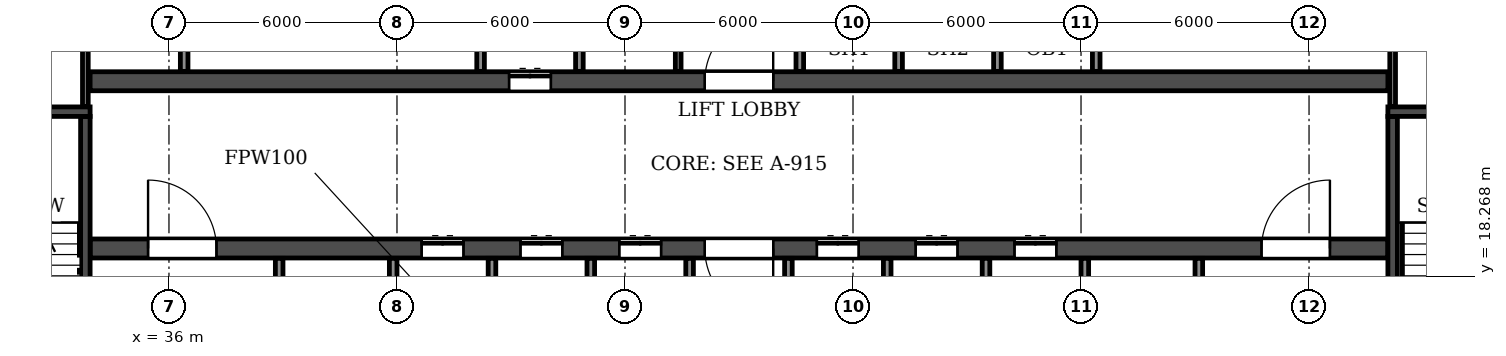
"""IFC4 building model, lengths in metres.
Left out: names, types, materials, properties, quantities, classifications, styles, units other than length and angle.
Written with IfcOpenShell. Run it as: python <this file> out.ifc"""

import sys

from ifc_helpers import new_model, si_unit, direction, frame, frame_2d, origin, place, context, subcontext, project, spatial, rectangle, extrude, element, fill, save


model = new_model("IFC4")
c1 = context("Model", 3, precision=1e-05, world=origin(), true_north=direction((0.0, 1.0)))
c2 = subcontext(c1, "Body", "Model", "MODEL_VIEW")
j1 = project(units=[si_unit("LENGTHUNIT", "METRE"), si_unit("PLANEANGLEUNIT", "RADIAN")], contexts=[c1])
p1 = place(None, origin())
s1 = spatial("IfcSite", under=j1, at=p1, CompositionType="ELEMENT")
p2 = place(p1, origin())
s2 = spatial("IfcBuilding", under=s1, at=p2, CompositionType="ELEMENT")
p3 = place(p2, frame((0.0, 0.0, 76.2)))
s3 = spatial("IfcBuildingStorey", under=s2, at=p3, CompositionType="ELEMENT", Elevation=76.2)
p4 = place(p3, frame((33.925, 19.0, 0.0), z_axis=(0.0, 0.0, 1.0), x_axis=(1.0, 0.0, 0.0)))
e1 = element("IfcWall", 1, at=p4, inside=s3, PredefinedType="SOLIDWALL", context=c2, shape_type="SweptSolid", body=[
    extrude(rectangle(XDim=34.15, YDim=0.5, at=frame_2d((17.075, 0.0))), origin(), (0.0, 0.0, 1.0), 3.06),
])
p5 = place(p4, frame((16.175, 0.0, 0.0)))
e2 = element("IfcOpeningElement", 2, at=p5, cuts=e1, PredefinedType="OPENING", context=c2, shape_type="SweptSolid", body=[
    extrude(rectangle(XDim=1.8, YDim=2.1, at=frame_2d((0.9, 1.05))), frame((0.0, 0.26, 0.0), z_axis=(0.0, -1.0, 0.0), x_axis=(1.0, 0.0, 0.0)), (0.0, 0.0, 1.0), 0.52),
])
p6 = place(p4, frame((1.525, 0.0, 0.0)))
e3 = element("IfcOpeningElement", 3, at=p6, cuts=e1, PredefinedType="OPENING", context=c2, shape_type="SweptSolid", body=[
    extrude(rectangle(XDim=1.8, YDim=2.1, at=frame_2d((0.9, 1.05))), frame((0.0, 0.26, 0.0), z_axis=(0.0, -1.0, 0.0), x_axis=(1.0, 0.0, 0.0)), (0.0, 0.0, 1.0), 0.52),
])
p7 = place(p4, frame((8.725, 0.0, 0.0)))
e4 = element("IfcOpeningElement", 4, at=p7, cuts=e1, PredefinedType="OPENING", context=c2, shape_type="SweptSolid", body=[
    extrude(rectangle(XDim=1.1, YDim=2.1, at=frame_2d((0.55, 1.05))), frame((0.0, 0.26, 0.0), z_axis=(0.0, -1.0, 0.0), x_axis=(1.0, 0.0, 0.0)), (0.0, 0.0, 1.0), 0.52),
])
p8 = place(p4, frame((11.325, 0.0, 0.0)))
e5 = element("IfcOpeningElement", 5, at=p8, cuts=e1, PredefinedType="OPENING", context=c2, shape_type="SweptSolid", body=[
    extrude(rectangle(XDim=1.1, YDim=2.1, at=frame_2d((0.55, 1.05))), frame((0.0, 0.26, 0.0), z_axis=(0.0, -1.0, 0.0), x_axis=(1.0, 0.0, 0.0)), (0.0, 0.0, 1.0), 0.52),
])
p9 = place(p4, frame((13.925, 0.0, 0.0)))
e6 = element("IfcOpeningElement", 6, at=p9, cuts=e1, PredefinedType="OPENING", context=c2, shape_type="SweptSolid", body=[
    extrude(rectangle(XDim=1.1, YDim=2.1, at=frame_2d((0.55, 1.05))), frame((0.0, 0.26, 0.0), z_axis=(0.0, -1.0, 0.0), x_axis=(1.0, 0.0, 0.0)), (0.0, 0.0, 1.0), 0.52),
])
p10 = place(p4, frame((19.125, 0.0, 0.0)))
e7 = element("IfcOpeningElement", 7, at=p10, cuts=e1, PredefinedType="OPENING", context=c2, shape_type="SweptSolid", body=[
    extrude(rectangle(XDim=1.1, YDim=2.1, at=frame_2d((0.55, 1.05))), frame((0.0, 0.26, 0.0), z_axis=(0.0, -1.0, 0.0), x_axis=(1.0, 0.0, 0.0)), (0.0, 0.0, 1.0), 0.52),
])
p11 = place(p4, frame((21.725, 0.0, 0.0)))
e8 = element("IfcOpeningElement", 8, at=p11, cuts=e1, PredefinedType="OPENING", context=c2, shape_type="SweptSolid", body=[
    extrude(rectangle(XDim=1.1, YDim=2.1, at=frame_2d((0.55, 1.05))), frame((0.0, 0.26, 0.0), z_axis=(0.0, -1.0, 0.0), x_axis=(1.0, 0.0, 0.0)), (0.0, 0.0, 1.0), 0.52),
])
p12 = place(p4, frame((24.325, 0.0, 0.0)))
e9 = element("IfcOpeningElement", 9, at=p12, cuts=e1, PredefinedType="OPENING", context=c2, shape_type="SweptSolid", body=[
    extrude(rectangle(XDim=1.1, YDim=2.1, at=frame_2d((0.55, 1.05))), frame((0.0, 0.26, 0.0), z_axis=(0.0, -1.0, 0.0), x_axis=(1.0, 0.0, 0.0)), (0.0, 0.0, 1.0), 0.52),
])
p13 = place(p4, frame((30.825, 0.0, 0.0)))
e10 = element("IfcOpeningElement", 10, at=p13, cuts=e1, PredefinedType="OPENING", context=c2, shape_type="SweptSolid", body=[
    extrude(rectangle(XDim=1.8, YDim=2.1, at=frame_2d((0.9, 1.05))), frame((0.0, 0.26, 0.0), z_axis=(0.0, -1.0, 0.0), x_axis=(1.0, 0.0, 0.0)), (0.0, 0.0, 1.0), 0.52),
])
p14 = place(p3, frame((33.925, 23.4, 0.0), z_axis=(0.0, 0.0, 1.0), x_axis=(1.0, 0.0, 0.0)))
e11 = element("IfcWall", 11, at=p14, inside=s3, PredefinedType="SOLIDWALL", context=c2, shape_type="SweptSolid", body=[
    extrude(rectangle(XDim=34.15, YDim=0.5, at=frame_2d((17.075, 0.0))), origin(), (0.0, 0.0, 1.0), 3.06),
])
p15 = place(p14, frame((16.175, 0.0, 0.0)))
e12 = element("IfcOpeningElement", 12, at=p15, cuts=e11, PredefinedType="OPENING", context=c2, shape_type="SweptSolid", body=[
    extrude(rectangle(XDim=1.8, YDim=2.1, at=frame_2d((0.9, 1.05))), frame((0.0, 0.26, 0.0), z_axis=(0.0, -1.0, 0.0), x_axis=(1.0, 0.0, 0.0)), (0.0, 0.0, 1.0), 0.52),
])
p16 = place(p14, frame((11.025, 0.0, 0.0)))
e13 = element("IfcOpeningElement", 13, at=p16, cuts=e11, PredefinedType="OPENING", context=c2, shape_type="SweptSolid", body=[
    extrude(rectangle(XDim=1.1, YDim=2.1, at=frame_2d((0.55, 1.05))), frame((0.0, 0.26, 0.0), z_axis=(0.0, -1.0, 0.0), x_axis=(1.0, 0.0, 0.0)), (0.0, 0.0, 1.0), 0.52),
])
p17 = place(p3, frame((33.8, 14.85, 0.0), z_axis=(0.0, 0.0, 1.0), x_axis=(0.0, 1.0, 0.0)))
e14 = element("IfcWall", 14, at=p17, inside=s3, PredefinedType="SOLIDWALL", context=c2, shape_type="SweptSolid", body=[
    extrude(rectangle(XDim=7.625, YDim=0.25, at=frame_2d((3.812, 0.0))), origin(), (0.0, 0.0, 1.0), 3.06),
])
p18 = place(p17, frame((0.45, 0.0, 0.0)))
e15 = element("IfcOpeningElement", 15, at=p18, cuts=e14, PredefinedType="OPENING", context=c2, shape_type="SweptSolid", body=[
    extrude(rectangle(XDim=1.0, YDim=2.1, at=frame_2d((0.5, 1.05))), frame((0.0, 0.135, 0.0), z_axis=(0.0, -1.0, 0.0), x_axis=(1.0, 0.0, 0.0)), (0.0, 0.0, 1.0), 0.27),
])
p19 = place(p3, frame((29.875, 22.6, 0.0), z_axis=(0.0, 0.0, 1.0), x_axis=(1.0, 0.0, 0.0)))
e16 = element("IfcWall", 16, at=p19, inside=s3, PredefinedType="SOLIDWALL", context=c2, shape_type="SweptSolid", body=[
    extrude(rectangle(XDim=4.05, YDim=0.25, at=frame_2d((2.025, 0.0))), origin(), (0.0, 0.0, 1.0), 3.06),
])
p20 = place(p3, frame((68.2, 14.85, 0.0), z_axis=(0.0, 0.0, 1.0), x_axis=(0.0, 1.0, 0.0)))
e17 = element("IfcWall", 17, at=p20, inside=s3, PredefinedType="SOLIDWALL", context=c2, shape_type="SweptSolid", body=[
    extrude(rectangle(XDim=7.625, YDim=0.25, at=frame_2d((3.812, 0.0))), origin(), (0.0, 0.0, 1.0), 3.06),
])
p21 = place(p20, frame((0.45, 0.0, 0.0)))
e18 = element("IfcOpeningElement", 18, at=p21, cuts=e17, PredefinedType="OPENING", context=c2, shape_type="SweptSolid", body=[
    extrude(rectangle(XDim=1.0, YDim=2.1, at=frame_2d((0.5, 1.05))), frame((0.0, 0.135, 0.0), z_axis=(0.0, -1.0, 0.0), x_axis=(1.0, 0.0, 0.0)), (0.0, 0.0, 1.0), 0.27),
])
p22 = place(p3, frame((68.075, 22.6, 0.0), z_axis=(0.0, 0.0, 1.0), x_axis=(1.0, 0.0, 0.0)))
e19 = element("IfcWall", 19, at=p22, inside=s3, PredefinedType="SOLIDWALL", context=c2, shape_type="SweptSolid", body=[
    extrude(rectangle(XDim=4.05, YDim=0.25, at=frame_2d((2.025, 0.0))), origin(), (0.0, 0.0, 1.0), 3.06),
])
p23 = place(p3, frame((49.4, 23.66, 0.0), z_axis=(0.0, 0.0, 1.0), x_axis=(0.0, 1.0, 0.0)))
e20 = element("IfcWall", 20, at=p23, inside=s3, PredefinedType="PARTITIONING", context=c2, shape_type="SweptSolid", body=[
    extrude(rectangle(XDim=3.88, YDim=0.15, at=frame_2d((1.94, 0.0))), origin(), (0.0, 0.0, 1.0), 3.06),
])
p24 = place(p3, frame((36.4, 23.66, 0.0), z_axis=(0.0, 0.0, 1.0), x_axis=(0.0, 1.0, 0.0)))
e21 = element("IfcWall", 21, at=p24, inside=s3, PredefinedType="PARTITIONING", context=c2, shape_type="SweptSolid", body=[
    extrude(rectangle(XDim=3.88, YDim=0.2, at=frame_2d((1.94, 0.0))), origin(), (0.0, 0.0, 1.0), 3.06),
])
for number, where, z_axis, x_axis in (
    (22, (33.8, 22.735, 0.0), (0.0, 0.0, 1.0), (0.0, 1.0, 0.0)),
    (23, (68.2, 22.735, 0.0), (0.0, 0.0, 1.0), (0.0, 1.0, 0.0)),
):
    element("IfcWall", number, at=place(p3, frame(where, z_axis=z_axis, x_axis=x_axis)), inside=s3, PredefinedType="PARTITIONING", context=c2, shape_type="SweptSolid", body=[
        extrude(rectangle(XDim=4.805, YDim=0.15, at=frame_2d((2.402, 0.0))), origin(), (0.0, 0.0, 1.0), 3.06),
    ])
p25 = place(p3, frame((38.9, 14.86, 0.0), z_axis=(0.0, 0.0, 1.0), x_axis=(0.0, 1.0, 0.0)))
e24 = element("IfcWall", 24, at=p25, inside=s3, PredefinedType="PARTITIONING", context=c2, shape_type="SweptSolid", body=[
    extrude(rectangle(XDim=3.88, YDim=0.2, at=frame_2d((1.94, 0.0))), origin(), (0.0, 0.0, 1.0), 3.06),
])
p26 = place(p25, frame((1.39, 0.0, 0.0)))
e25 = element("IfcOpeningElement", 25, at=p26, cuts=e24, PredefinedType="OPENING", context=c2, shape_type="SweptSolid", body=[
    extrude(rectangle(XDim=1.1, YDim=2.1, at=frame_2d((0.55, 1.05))), frame((0.0, 0.11, 0.0), z_axis=(0.0, -1.0, 0.0), x_axis=(1.0, 0.0, 0.0)), (0.0, 0.0, 1.0), 0.22),
])
p27 = place(p3, frame((41.9, 14.86, 0.0), z_axis=(0.0, 0.0, 1.0), x_axis=(0.0, 1.0, 0.0)))
e26 = element("IfcWall", 26, at=p27, inside=s3, PredefinedType="PARTITIONING", context=c2, shape_type="SweptSolid", body=[
    extrude(rectangle(XDim=3.88, YDim=0.2, at=frame_2d((1.94, 0.0))), origin(), (0.0, 0.0, 1.0), 3.06),
])
p28 = place(p3, frame((44.2, 23.66, 0.0), z_axis=(0.0, 0.0, 1.0), x_axis=(0.0, 1.0, 0.0)))
e27 = element("IfcWall", 27, at=p28, inside=s3, PredefinedType="PARTITIONING", context=c2, shape_type="SweptSolid", body=[
    extrude(rectangle(XDim=3.88, YDim=0.2, at=frame_2d((1.94, 0.0))), origin(), (0.0, 0.0, 1.0), 3.06),
])
p29 = place(p3, frame((44.5, 16.3, 0.0), z_axis=(0.0, 0.0, 1.0), x_axis=(0.0, 1.0, 0.0)))
e28 = element("IfcWall", 28, at=p29, inside=s3, PredefinedType="PARTITIONING", context=c2, shape_type="SweptSolid", body=[
    extrude(rectangle(XDim=2.44, YDim=0.2, at=frame_2d((1.22, 0.0))), origin(), (0.0, 0.0, 1.0), 3.06),
])
p30 = place(p3, frame((46.8, 23.66, 0.0), z_axis=(0.0, 0.0, 1.0), x_axis=(0.0, 1.0, 0.0)))
e29 = element("IfcWall", 29, at=p30, inside=s3, PredefinedType="PARTITIONING", context=c2, shape_type="SweptSolid", body=[
    extrude(rectangle(XDim=3.88, YDim=0.2, at=frame_2d((1.94, 0.0))), origin(), (0.0, 0.0, 1.0), 3.06),
])
for number, where, z_axis, x_axis in (
    (30, (47.1, 16.3, 0.0), (0.0, 0.0, 1.0), (0.0, 1.0, 0.0)),
    (31, (49.7, 16.3, 0.0), (0.0, 0.0, 1.0), (0.0, 1.0, 0.0)),
    (32, (52.3, 16.3, 0.0), (0.0, 0.0, 1.0), (0.0, 1.0, 0.0)),
):
    element("IfcWall", number, at=place(p3, frame(where, z_axis=z_axis, x_axis=x_axis)), inside=s3, PredefinedType="PARTITIONING", context=c2, shape_type="SweptSolid", body=[
        extrude(rectangle(XDim=2.44, YDim=0.2, at=frame_2d((1.22, 0.0))), origin(), (0.0, 0.0, 1.0), 3.06),
    ])
p31 = place(p3, frame((52.6, 23.66, 0.0), z_axis=(0.0, 0.0, 1.0), x_axis=(0.0, 1.0, 0.0)))
e33 = element("IfcWall", 33, at=p31, inside=s3, PredefinedType="PARTITIONING", context=c2, shape_type="SweptSolid", body=[
    extrude(rectangle(XDim=2.44, YDim=0.2, at=frame_2d((1.22, 0.0))), origin(), (0.0, 0.0, 1.0), 3.06),
])
p32 = place(p3, frame((54.9, 16.3, 0.0), z_axis=(0.0, 0.0, 1.0), x_axis=(0.0, 1.0, 0.0)))
e34 = element("IfcWall", 34, at=p32, inside=s3, PredefinedType="PARTITIONING", context=c2, shape_type="SweptSolid", body=[
    extrude(rectangle(XDim=2.44, YDim=0.2, at=frame_2d((1.22, 0.0))), origin(), (0.0, 0.0, 1.0), 3.06),
])
p33 = place(p3, frame((55.2, 23.66, 0.0), z_axis=(0.0, 0.0, 1.0), x_axis=(0.0, 1.0, 0.0)))
e35 = element("IfcWall", 35, at=p33, inside=s3, PredefinedType="PARTITIONING", context=c2, shape_type="SweptSolid", body=[
    extrude(rectangle(XDim=2.44, YDim=0.2, at=frame_2d((1.22, 0.0))), origin(), (0.0, 0.0, 1.0), 3.06),
])
p34 = place(p3, frame((57.5, 16.3, 0.0), z_axis=(0.0, 0.0, 1.0), x_axis=(0.0, 1.0, 0.0)))
e36 = element("IfcWall", 36, at=p34, inside=s3, PredefinedType="PARTITIONING", context=c2, shape_type="SweptSolid", body=[
    extrude(rectangle(XDim=2.44, YDim=0.2, at=frame_2d((1.22, 0.0))), origin(), (0.0, 0.0, 1.0), 3.06),
])
p35 = place(p3, frame((57.8, 23.66, 0.0), z_axis=(0.0, 0.0, 1.0), x_axis=(0.0, 1.0, 0.0)))
e37 = element("IfcWall", 37, at=p35, inside=s3, PredefinedType="PARTITIONING", context=c2, shape_type="SweptSolid", body=[
    extrude(rectangle(XDim=2.44, YDim=0.2, at=frame_2d((1.22, 0.0))), origin(), (0.0, 0.0, 1.0), 3.06),
])
p36 = place(p3, frame((60.1, 14.86, 0.0), z_axis=(0.0, 0.0, 1.0), x_axis=(0.0, 1.0, 0.0)))
e38 = element("IfcWall", 38, at=p36, inside=s3, PredefinedType="PARTITIONING", context=c2, shape_type="SweptSolid", body=[
    extrude(rectangle(XDim=3.88, YDim=0.2, at=frame_2d((1.94, 0.0))), origin(), (0.0, 0.0, 1.0), 3.06),
])
p37 = place(p3, frame((60.4, 23.66, 0.0), z_axis=(0.0, 0.0, 1.0), x_axis=(0.0, 1.0, 0.0)))
e39 = element("IfcWall", 39, at=p37, inside=s3, PredefinedType="PARTITIONING", context=c2, shape_type="SweptSolid", body=[
    extrude(rectangle(XDim=2.44, YDim=0.2, at=frame_2d((1.22, 0.0))), origin(), (0.0, 0.0, 1.0), 3.06),
])
p38 = place(p3, frame((63.1, 14.86, 0.0), z_axis=(0.0, 0.0, 1.0), x_axis=(0.0, 1.0, 0.0)))
e40 = element("IfcWall", 40, at=p38, inside=s3, PredefinedType="PARTITIONING", context=c2, shape_type="SweptSolid", body=[
    extrude(rectangle(XDim=3.88, YDim=0.2, at=frame_2d((1.94, 0.0))), origin(), (0.0, 0.0, 1.0), 3.06),
])
p39 = place(p38, frame((1.39, 0.0, 0.0)))
e41 = element("IfcOpeningElement", 41, at=p39, cuts=e40, PredefinedType="OPENING", context=c2, shape_type="SweptSolid", body=[
    extrude(rectangle(XDim=1.1, YDim=2.1, at=frame_2d((0.55, 1.05))), frame((0.0, 0.11, 0.0), z_axis=(0.0, -1.0, 0.0), x_axis=(1.0, 0.0, 0.0)), (0.0, 0.0, 1.0), 0.22),
])
p40 = place(p15, origin())
e42 = element("IfcDoor", 42, at=p40, inside=s3, OperationType="DOUBLE_DOOR_SINGLE_SWING", PredefinedType="DOOR", context=c2, shape_type="SweptSolid", body=[
    extrude(rectangle(XDim=1.8, YDim=2.1, at=frame_2d((0.9, 1.05))), frame((0.0, 0.025, 0.0), z_axis=(0.0, -1.0, 0.0), x_axis=(1.0, 0.0, 0.0)), (0.0, 0.0, 1.0), 0.05),
])
fill(e12, e42)
p41 = place(p5, frame((1.8, 0.0, 0.0), z_axis=(0.0, 0.0, 1.0), x_axis=(-1.0, 0.0, 0.0)))
e43 = element("IfcDoor", 43, at=p41, inside=s3, OperationType="DOUBLE_DOOR_SINGLE_SWING", PredefinedType="DOOR", context=c2, shape_type="SweptSolid", body=[
    extrude(rectangle(XDim=1.8, YDim=2.1, at=frame_2d((0.9, 1.05))), frame((0.0, 0.025, 0.0), z_axis=(0.0, -1.0, 0.0), x_axis=(1.0, 0.0, 0.0)), (0.0, 0.0, 1.0), 0.05),
])
fill(e2, e43)
p42 = place(p6, origin())
e44 = element("IfcDoor", 44, at=p42, inside=s3, OperationType="DOUBLE_DOOR_SINGLE_SWING", PredefinedType="DOOR", context=c2, shape_type="SweptSolid", body=[
    extrude(rectangle(XDim=1.8, YDim=2.1, at=frame_2d((0.9, 1.05))), frame((0.0, 0.025, 0.0), z_axis=(0.0, -1.0, 0.0), x_axis=(1.0, 0.0, 0.0)), (0.0, 0.0, 1.0), 0.05),
])
fill(e3, e44)
p43 = place(p7, origin())
e45 = element("IfcDoor", 45, at=p43, inside=s3, OperationType="DOUBLE_DOOR_SLIDING", PredefinedType="DOOR", context=c2, shape_type="SweptSolid", body=[
    extrude(rectangle(XDim=1.1, YDim=2.1, at=frame_2d((0.55, 1.05))), frame((0.0, 0.025, 0.0), z_axis=(0.0, -1.0, 0.0), x_axis=(1.0, 0.0, 0.0)), (0.0, 0.0, 1.0), 0.05),
])
fill(e4, e45)
p44 = place(p16, origin())
e46 = element("IfcDoor", 46, at=p44, inside=s3, OperationType="DOUBLE_DOOR_SLIDING", PredefinedType="DOOR", context=c2, shape_type="SweptSolid", body=[
    extrude(rectangle(XDim=1.1, YDim=2.1, at=frame_2d((0.55, 1.05))), frame((0.0, 0.025, 0.0), z_axis=(0.0, -1.0, 0.0), x_axis=(1.0, 0.0, 0.0)), (0.0, 0.0, 1.0), 0.05),
])
fill(e13, e46)
p45 = place(p8, origin())
e47 = element("IfcDoor", 47, at=p45, inside=s3, OperationType="DOUBLE_DOOR_SLIDING", PredefinedType="DOOR", context=c2, shape_type="SweptSolid", body=[
    extrude(rectangle(XDim=1.1, YDim=2.1, at=frame_2d((0.55, 1.05))), frame((0.0, 0.025, 0.0), z_axis=(0.0, -1.0, 0.0), x_axis=(1.0, 0.0, 0.0)), (0.0, 0.0, 1.0), 0.05),
])
fill(e5, e47)
p46 = place(p9, origin())
e48 = element("IfcDoor", 48, at=p46, inside=s3, OperationType="DOUBLE_DOOR_SLIDING", PredefinedType="DOOR", context=c2, shape_type="SweptSolid", body=[
    extrude(rectangle(XDim=1.1, YDim=2.1, at=frame_2d((0.55, 1.05))), frame((0.0, 0.025, 0.0), z_axis=(0.0, -1.0, 0.0), x_axis=(1.0, 0.0, 0.0)), (0.0, 0.0, 1.0), 0.05),
])
fill(e6, e48)
p47 = place(p10, origin())
e49 = element("IfcDoor", 49, at=p47, inside=s3, OperationType="DOUBLE_DOOR_SLIDING", PredefinedType="DOOR", context=c2, shape_type="SweptSolid", body=[
    extrude(rectangle(XDim=1.1, YDim=2.1, at=frame_2d((0.55, 1.05))), frame((0.0, 0.025, 0.0), z_axis=(0.0, -1.0, 0.0), x_axis=(1.0, 0.0, 0.0)), (0.0, 0.0, 1.0), 0.05),
])
fill(e7, e49)
p48 = place(p11, origin())
e50 = element("IfcDoor", 50, at=p48, inside=s3, OperationType="DOUBLE_DOOR_SLIDING", PredefinedType="DOOR", context=c2, shape_type="SweptSolid", body=[
    extrude(rectangle(XDim=1.1, YDim=2.1, at=frame_2d((0.55, 1.05))), frame((0.0, 0.025, 0.0), z_axis=(0.0, -1.0, 0.0), x_axis=(1.0, 0.0, 0.0)), (0.0, 0.0, 1.0), 0.05),
])
fill(e8, e50)
p49 = place(p12, origin())
e51 = element("IfcDoor", 51, at=p49, inside=s3, OperationType="DOUBLE_DOOR_SLIDING", PredefinedType="DOOR", context=c2, shape_type="SweptSolid", body=[
    extrude(rectangle(XDim=1.1, YDim=2.1, at=frame_2d((0.55, 1.05))), frame((0.0, 0.025, 0.0), z_axis=(0.0, -1.0, 0.0), x_axis=(1.0, 0.0, 0.0)), (0.0, 0.0, 1.0), 0.05),
])
fill(e9, e51)
p50 = place(p13, origin())
e52 = element("IfcDoor", 52, at=p50, inside=s3, OperationType="DOUBLE_DOOR_SINGLE_SWING", PredefinedType="DOOR", context=c2, shape_type="SweptSolid", body=[
    extrude(rectangle(XDim=1.8, YDim=2.1, at=frame_2d((0.9, 1.05))), frame((0.0, 0.025, 0.0), z_axis=(0.0, -1.0, 0.0), x_axis=(1.0, 0.0, 0.0)), (0.0, 0.0, 1.0), 0.05),
])
fill(e10, e52)
save(model, sys.argv[1])
